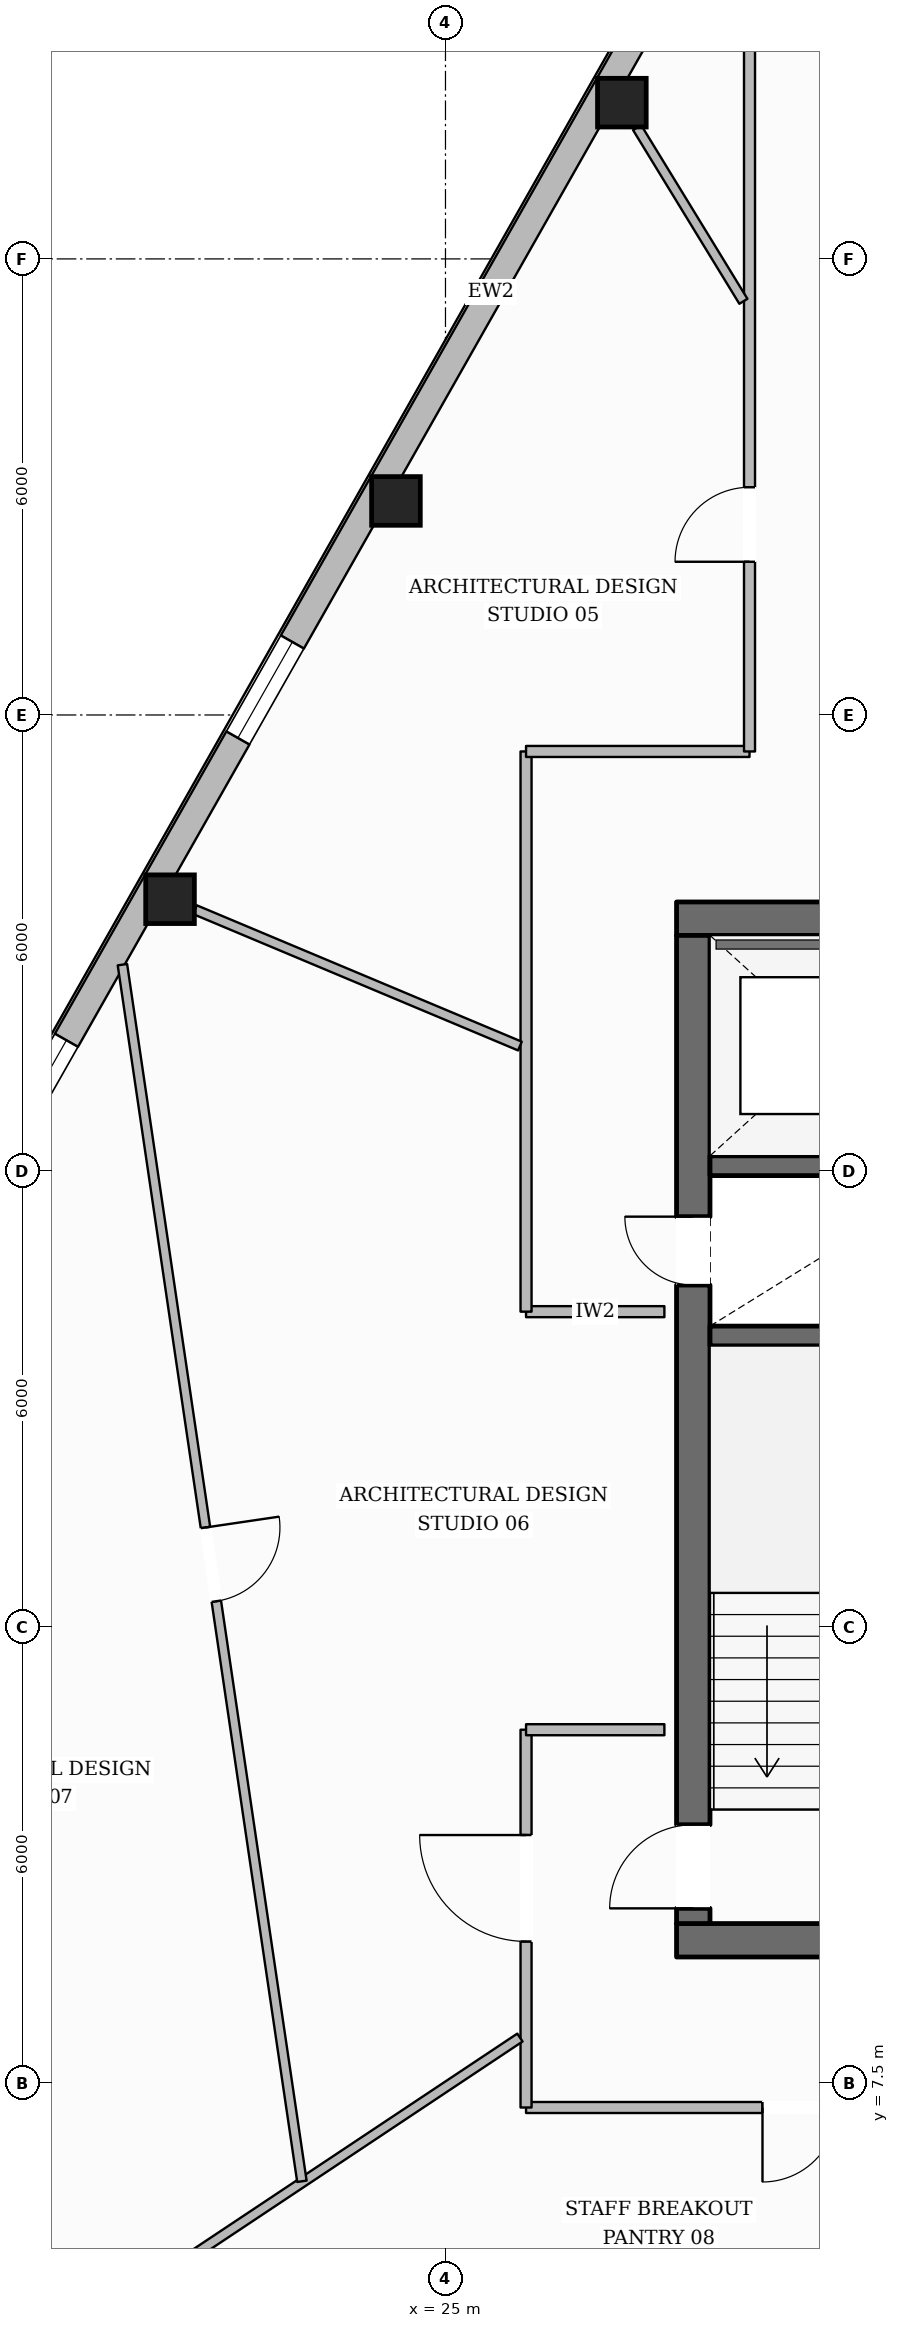
"""IFC4 building model, lengths in metres.
Left out: names, types, materials, properties, quantities, classifications, styles, units other than length and angle.
Written with IfcOpenShell. Run it as: python <this file> out.ifc"""

import sys

from ifc_helpers import new_model, si_unit, direction, frame, frame_2d, origin, origin_2d, place, context, subcontext, project, spatial, rectangle, hollow_rectangle, extrude, element, fill, save


model = new_model("IFC4")
c1 = context("Model", 3, precision=1e-05, world=origin(), true_north=direction((0.0, 1.0)))
c2 = subcontext(c1, "Body", "Model", "MODEL_VIEW")
j1 = project(units=[si_unit("LENGTHUNIT", "METRE"), si_unit("PLANEANGLEUNIT", "RADIAN")], contexts=[c1])
p1 = place(None, origin())
s1 = spatial("IfcSite", under=j1, at=p1, CompositionType="ELEMENT")
p2 = place(p1, origin())
s2 = spatial("IfcBuilding", under=s1, at=p2, CompositionType="ELEMENT")
p3 = place(p2, frame((0.0, 0.0, 165.0)))
s3 = spatial("IfcBuildingStorey", under=s2, at=p3, CompositionType="ELEMENT", Elevation=165.0)
p4 = place(p3, frame((28.04, 9.38, 0.0), z_axis=(0.0, 0.0, 1.0), x_axis=(1.0, 0.0, 0.0)))
e1 = element("IfcWall", 1, at=p4, inside=s3, PredefinedType="SOLIDWALL", context=c2, shape_type="SweptSolid", body=[
    extrude(rectangle(XDim=19.92, YDim=0.44, at=frame_2d((9.96, 0.0))), origin(), (0.0, 0.0, 1.0), 3.6),
])
p5 = place(p4, frame((10.46, 0.0, 0.0)))
e2 = element("IfcOpeningElement", 2, at=p5, cuts=e1, PredefinedType="OPENING", context=c2, shape_type="SweptSolid", body=[
    extrude(rectangle(XDim=1.4, YDim=2.2, at=frame_2d((0.7, 1.1))), frame((0.0, 0.23, 0.0), z_axis=(0.0, -1.0, 0.0), x_axis=(1.0, 0.0, 0.0)), (0.0, 0.0, 1.0), 0.46),
])
p6 = place(p3, frame((28.04, 22.82, 0.0), z_axis=(0.0, 0.0, 1.0), x_axis=(1.0, 0.0, 0.0)))
e3 = element("IfcWall", 3, at=p6, inside=s3, PredefinedType="SOLIDWALL", context=c2, shape_type="SweptSolid", body=[
    extrude(rectangle(XDim=19.92, YDim=0.44, at=frame_2d((9.96, 0.0))), origin(), (0.0, 0.0, 1.0), 3.6),
])
p7 = place(p6, frame((6.235, 0.0, 0.0)))
e4 = element("IfcOpeningElement", 4, at=p7, cuts=e3, PredefinedType="OPENING", context=c2, shape_type="SweptSolid", body=[
    extrude(rectangle(XDim=1.05, YDim=2.15, at=frame_2d((0.525, 1.075))), frame((0.0, 0.23, 0.0), z_axis=(0.0, -1.0, 0.0), x_axis=(1.0, 0.0, 0.0)), (0.0, 0.0, 1.0), 0.46),
])
p8 = place(p6, frame((12.635, 0.0, 0.0)))
e5 = element("IfcOpeningElement", 5, at=p8, cuts=e3, PredefinedType="OPENING", context=c2, shape_type="SweptSolid", body=[
    extrude(rectangle(XDim=1.05, YDim=2.15, at=frame_2d((0.525, 1.075))), frame((0.0, 0.23, 0.0), z_axis=(0.0, -1.0, 0.0), x_axis=(1.0, 0.0, 0.0)), (0.0, 0.0, 1.0), 0.46),
])
p9 = place(p3, frame((28.26, 9.6, 0.0), z_axis=(0.0, 0.0, 1.0), x_axis=(0.0, 1.0, 0.0)))
e6 = element("IfcWall", 6, at=p9, inside=s3, PredefinedType="SOLIDWALL", context=c2, shape_type="SweptSolid", body=[
    extrude(rectangle(XDim=13.0, YDim=0.44, at=frame_2d((6.5, 0.0))), origin(), (0.0, 0.0, 1.0), 3.6),
])
p10 = place(p9, frame((0.2, 0.0, 0.0)))
e7 = element("IfcOpeningElement", 7, at=p10, cuts=e6, PredefinedType="OPENING", context=c2, shape_type="SweptSolid", body=[
    extrude(rectangle(XDim=1.1, YDim=2.15, at=frame_2d((0.55, 1.075))), frame((0.0, 0.23, 0.0), z_axis=(0.0, -1.0, 0.0), x_axis=(1.0, 0.0, 0.0)), (0.0, 0.0, 1.0), 0.46),
])
p11 = place(p9, frame((8.4, 0.0, 0.0)))
e8 = element("IfcOpeningElement", 8, at=p11, cuts=e6, PredefinedType="OPENING", context=c2, shape_type="SweptSolid", body=[
    extrude(rectangle(XDim=0.9, YDim=2.1, at=frame_2d((0.45, 1.05))), frame((0.0, 0.23, 0.0), z_axis=(0.0, -1.0, 0.0), x_axis=(1.0, 0.0, 0.0)), (0.0, 0.0, 1.0), 0.46),
])
for number, where, z_axis, x_axis in (
    (9, (28.48, 17.33, 0.0), (0.0, 0.0, 1.0), (1.0, 0.0, 0.0)),
    (10, (28.48, 19.57, 0.0), (0.0, 0.0, 1.0), (1.0, 0.0, 0.0)),
):
    element("IfcWall", number, at=place(p3, frame(where, z_axis=z_axis, x_axis=x_axis)), inside=s3, PredefinedType="SHEAR", context=c2, shape_type="SweptSolid", body=[
        extrude(rectangle(XDim=3.2, YDim=0.26, at=frame_2d((1.6, 0.0))), origin(), (0.0, 0.0, 1.0), 3.6),
    ])
for number, where, z_axis, x_axis in (
    (11, (27.321, 33.556, 0.0), (0.0, 0.0, 1.0), (1.0, 0.0, 0.0)),
    (12, (24.348, 28.316, 0.0), (0.0, 0.0, 1.0), (1.0, 0.0, 0.0)),
    (13, (21.376, 23.076, 0.0), (0.0, 0.0, 1.0), (1.0, 0.0, 0.0)),
):
    element("IfcColumn", number, at=place(p3, frame(where, z_axis=z_axis, x_axis=x_axis)), inside=s3, PredefinedType="COLUMN", context=c2, shape_type="SweptSolid", body=[
        extrude(hollow_rectangle(XDim=0.64, YDim=0.64, WallThickness=0.028, at=origin_2d()), origin(), (0.0, 0.0, 1.0), 3.6),
    ])
p12 = place(p3, frame((14.964, 12.319, 0.0), z_axis=(0.0, 0.0, 1.0), x_axis=(0.493387150796, 0.869809817966, 0.0)))
e14 = element("IfcWall", 14, at=p12, inside=s3, PredefinedType="STANDARD", context=c2, shape_type="SweptSolid", body=[
    extrude(rectangle(XDim=37.096, YDim=0.35, at=frame_2d((18.548, 0.0))), origin(), (0.0, 0.0, 1.0), 3.132),
])
p13 = place(p12, frame((32.879, 0.0, 0.65)))
e15 = element("IfcOpeningElement", 15, at=p13, cuts=e14, PredefinedType="OPENING", context=c2, shape_type="SweptSolid", body=[
    extrude(rectangle(XDim=1.45, YDim=1.75, at=frame_2d((0.725, 0.875))), frame((0.0, 0.185, 0.0), z_axis=(0.0, -1.0, 0.0), x_axis=(1.0, 0.0, 0.0)), (0.0, 0.0, 1.0), 0.37),
])
p14 = place(p12, frame((26.855, 0.0, 0.65)))
e16 = element("IfcOpeningElement", 16, at=p14, cuts=e14, PredefinedType="OPENING", context=c2, shape_type="SweptSolid", body=[
    extrude(rectangle(XDim=1.45, YDim=1.75, at=frame_2d((0.725, 0.875))), frame((0.0, 0.185, 0.0), z_axis=(0.0, -1.0, 0.0), x_axis=(1.0, 0.0, 0.0)), (0.0, 0.0, 1.0), 0.37),
])
p15 = place(p12, frame((14.807, 0.0, 0.65)))
e17 = element("IfcOpeningElement", 17, at=p15, cuts=e14, PredefinedType="OPENING", context=c2, shape_type="SweptSolid", body=[
    extrude(rectangle(XDim=1.45, YDim=1.75, at=frame_2d((0.725, 0.875))), frame((0.0, 0.185, 0.0), z_axis=(0.0, -1.0, 0.0), x_axis=(1.0, 0.0, 0.0)), (0.0, 0.0, 1.0), 0.37),
])
p16 = place(p12, frame((8.783, 0.0, 0.65)))
e18 = element("IfcOpeningElement", 18, at=p16, cuts=e14, PredefinedType="OPENING", context=c2, shape_type="SweptSolid", body=[
    extrude(rectangle(XDim=1.45, YDim=1.75, at=frame_2d((0.725, 0.875))), frame((0.0, 0.185, 0.0), z_axis=(0.0, -1.0, 0.0), x_axis=(1.0, 0.0, 0.0)), (0.0, 0.0, 1.0), 0.37),
])
p17 = place(p12, frame((2.759, 0.0, 0.65)))
e19 = element("IfcOpeningElement", 19, at=p17, cuts=e14, PredefinedType="OPENING", context=c2, shape_type="SweptSolid", body=[
    extrude(rectangle(XDim=1.45, YDim=1.75, at=frame_2d((0.725, 0.875))), frame((0.0, 0.185, 0.0), z_axis=(0.0, -1.0, 0.0), x_axis=(1.0, 0.0, 0.0)), (0.0, 0.0, 1.0), 0.37),
])
p18 = place(p3, frame((20.176, 3.686, 0.0), z_axis=(0.0, 0.0, 1.0), x_axis=(-0.493371164069, 0.869818886013, 0.0)))
e20 = element("IfcWall", 20, at=p18, inside=s3, PredefinedType="STANDARD", context=c2, shape_type="SweptSolid", body=[
    extrude(rectangle(XDim=10.563, YDim=0.3, at=frame_2d((5.282, 0.0))), origin(), (0.0, 0.0, 1.0), 3.132),
])
p19 = place(p18, frame((4.757, 0.0, 0.65)))
e21 = element("IfcOpeningElement", 21, at=p19, cuts=e20, PredefinedType="OPENING", context=c2, shape_type="SweptSolid", body=[
    extrude(rectangle(XDim=1.05, YDim=1.7, at=frame_2d((0.525, 0.85))), frame((0.0, 0.16, 0.0), z_axis=(0.0, -1.0, 0.0), x_axis=(1.0, 0.0, 0.0)), (0.0, 0.0, 1.0), 0.32),
])
p20 = place(p3, frame((27.88, 17.65, 0.0), z_axis=(0.0, 0.0, 1.0), x_axis=(-1.0, 0.0, 0.0)))
e22 = element("IfcWall", 22, at=p20, inside=s3, PredefinedType="PARTITIONING", context=c2, shape_type="SweptSolid", body=[
    extrude(rectangle(XDim=1.82, YDim=0.145, at=frame_2d((0.91, 0.0))), origin(), (0.0, 0.0, 1.0), 3.6),
])
p21 = place(p3, frame((26.06, 17.65, 0.0), z_axis=(0.0, 0.0, 1.0), x_axis=(0.0, 1.0, 0.0)))
e23 = element("IfcWall", 23, at=p21, inside=s3, PredefinedType="PARTITIONING", context=c2, shape_type="SweptSolid", body=[
    extrude(rectangle(XDim=7.37, YDim=0.145, at=frame_2d((3.685, 0.0))), origin(), (0.0, 0.0, 1.0), 3.339),
])
p22 = place(p3, frame((26.06, 25.02, 0.0), z_axis=(0.0, 0.0, 1.0), x_axis=(1.0, 0.0, 0.0)))
e24 = element("IfcWall", 24, at=p22, inside=s3, PredefinedType="PARTITIONING", context=c2, shape_type="SweptSolid", body=[
    extrude(rectangle(XDim=2.94, YDim=0.145, at=frame_2d((1.47, 0.0))), origin(), (0.0, 0.0, 1.0), 3.6),
])
p23 = place(p3, frame((29.0, 25.02, 0.0), z_axis=(0.0, 0.0, 1.0), x_axis=(0.0, 1.0, 0.0)))
e25 = element("IfcWall", 25, at=p23, inside=s3, PredefinedType="PARTITIONING", context=c2, shape_type="SweptSolid", body=[
    extrude(rectangle(XDim=9.367, YDim=0.145, at=frame_2d((4.684, 0.0))), origin(), (0.0, 0.0, 1.0), 3.6),
])
p24 = place(p23, frame((2.496, 0.0, 0.0)))
e26 = element("IfcOpeningElement", 26, at=p24, cuts=e25, PredefinedType="OPENING", context=c2, shape_type="SweptSolid", body=[
    extrude(rectangle(XDim=0.98, YDim=2.15, at=frame_2d((0.49, 1.075))), frame((0.0, 0.083, 0.0), z_axis=(0.0, -1.0, 0.0), x_axis=(1.0, 0.0, 0.0)), (0.0, 0.0, 1.0), 0.165),
])
p25 = place(p3, frame((49.94, 7.18, 0.0), z_axis=(0.0, 0.0, 1.0), x_axis=(-1.0, 0.0, 0.0)))
e27 = element("IfcWall", 27, at=p25, inside=s3, PredefinedType="PARTITIONING", context=c2, shape_type="SweptSolid", body=[
    extrude(rectangle(XDim=23.88, YDim=0.145, at=frame_2d((11.94, 0.0))), origin(), (0.0, 0.0, 1.0), 3.6),
])
p26 = place(p25, frame((19.789, 0.0, 0.0)))
e28 = element("IfcOpeningElement", 28, at=p26, cuts=e27, PredefinedType="OPENING", context=c2, shape_type="SweptSolid", body=[
    extrude(rectangle(XDim=0.98, YDim=2.15, at=frame_2d((0.49, 1.075))), frame((0.0, 0.083, 0.0), z_axis=(0.0, -1.0, 0.0), x_axis=(1.0, 0.0, 0.0)), (0.0, 0.0, 1.0), 0.165),
])
p27 = place(p25, frame((9.236, 0.0, 0.0)))
e29 = element("IfcOpeningElement", 29, at=p27, cuts=e27, PredefinedType="OPENING", context=c2, shape_type="SweptSolid", body=[
    extrude(rectangle(XDim=0.98, YDim=2.15, at=frame_2d((0.49, 1.075))), frame((0.0, 0.083, 0.0), z_axis=(0.0, -1.0, 0.0), x_axis=(1.0, 0.0, 0.0)), (0.0, 0.0, 1.0), 0.165),
])
p28 = place(p3, frame((26.06, 7.18, 0.0), z_axis=(0.0, 0.0, 1.0), x_axis=(0.0, 1.0, 0.0)))
e30 = element("IfcWall", 30, at=p28, inside=s3, PredefinedType="PARTITIONING", context=c2, shape_type="SweptSolid", body=[
    extrude(rectangle(XDim=4.97, YDim=0.145, at=frame_2d((2.485, 0.0))), origin(), (0.0, 0.0, 1.0), 3.6),
])
p29 = place(p28, frame((2.185, 0.0, 0.0)))
e31 = element("IfcOpeningElement", 31, at=p29, cuts=e30, PredefinedType="OPENING", context=c2, shape_type="SweptSolid", body=[
    extrude(rectangle(XDim=1.4, YDim=2.2, at=frame_2d((0.7, 1.1))), frame((0.0, 0.083, 0.0), z_axis=(0.0, -1.0, 0.0), x_axis=(1.0, 0.0, 0.0)), (0.0, 0.0, 1.0), 0.165),
])
p30 = place(p3, frame((26.06, 12.15, 0.0), z_axis=(0.0, 0.0, 1.0), x_axis=(1.0, 0.0, 0.0)))
e32 = element("IfcWall", 32, at=p30, inside=s3, PredefinedType="PARTITIONING", context=c2, shape_type="SweptSolid", body=[
    extrude(rectangle(XDim=1.82, YDim=0.145, at=frame_2d((0.91, 0.0))), origin(), (0.0, 0.0, 1.0), 3.6),
])
p31 = place(p3, frame((28.919, 30.942, 0.0), z_axis=(0.0, 0.0, 1.0), x_axis=(-0.52187383072, 0.85302268716, 0.0)))
e33 = element("IfcWall", 33, at=p31, inside=s3, PredefinedType="PARTITIONING", context=c2, shape_type="SweptSolid", body=[
    extrude(rectangle(XDim=2.679, YDim=0.125, at=frame_2d((1.34, 0.0))), origin(), (0.0, 0.0, 1.0), 3.6),
])
p32 = place(p3, frame((25.979, 21.144, 0.0), z_axis=(0.0, 0.0, 1.0), x_axis=(-0.922095611861, 0.38696212035, 0.0)))
e34 = element("IfcWall", 34, at=p32, inside=s3, PredefinedType="PARTITIONING", context=c2, shape_type="SweptSolid", body=[
    extrude(rectangle(XDim=4.637, YDim=0.125, at=frame_2d((2.318, 0.0))), origin(), (0.0, 0.0, 1.0), 3.6),
])
p33 = place(p3, frame((25.979, 8.1, 0.0), z_axis=(0.0, 0.0, 1.0), x_axis=(-0.832482321267, -0.554051608407, 0.0)))
e35 = element("IfcWall", 35, at=p33, inside=s3, PredefinedType="PARTITIONING", context=c2, shape_type="SweptSolid", body=[
    extrude(rectangle(XDim=6.604, YDim=0.125, at=frame_2d((3.302, 0.0))), origin(), (0.0, 0.0, 1.0), 3.141),
])
p34 = place(p3, frame((20.75, 22.215, 0.0), z_axis=(0.0, 0.0, 1.0), x_axis=(0.145949252276, -0.989292078084, 0.0)))
e36 = element("IfcWall", 36, at=p34, inside=s3, PredefinedType="PARTITIONING", context=c2, shape_type="SweptSolid", body=[
    extrude(rectangle(XDim=16.179, YDim=0.125, at=frame_2d((8.09, 0.0))), origin(), (0.0, 0.0, 1.0), 3.339),
])
p35 = place(p34, frame((7.485, 0.0, 0.0)))
e37 = element("IfcOpeningElement", 37, at=p35, cuts=e36, PredefinedType="OPENING", context=c2, shape_type="SweptSolid", body=[
    extrude(rectangle(XDim=0.98, YDim=2.15, at=frame_2d((0.49, 1.075))), frame((0.0, 0.073, 0.0), z_axis=(0.0, -1.0, 0.0), x_axis=(1.0, 0.0, 0.0)), (0.0, 0.0, 1.0), 0.145),
])
p36 = place(p15, origin())
e38 = element("IfcWindow", 38, at=p36, inside=s3, PartitioningType="SINGLE_PANEL", PredefinedType="WINDOW", context=c2, shape_type="SweptSolid", body=[
    extrude(rectangle(XDim=1.45, YDim=1.75, at=frame_2d((0.725, 0.875))), frame((0.0, 0.03, 0.0), z_axis=(0.0, -1.0, 0.0), x_axis=(1.0, 0.0, 0.0)), (0.0, 0.0, 1.0), 0.06),
])
fill(e17, e38)
p37 = place(p16, origin())
e39 = element("IfcWindow", 39, at=p37, inside=s3, PartitioningType="SINGLE_PANEL", PredefinedType="WINDOW", context=c2, shape_type="SweptSolid", body=[
    extrude(rectangle(XDim=1.45, YDim=1.75, at=frame_2d((0.725, 0.875))), frame((0.0, 0.03, 0.0), z_axis=(0.0, -1.0, 0.0), x_axis=(1.0, 0.0, 0.0)), (0.0, 0.0, 1.0), 0.06),
])
fill(e18, e39)
p38 = place(p10, origin())
e40 = element("IfcDoor", 40, at=p38, inside=s3, OperationType="SINGLE_SWING_LEFT", PredefinedType="DOOR", context=c2, shape_type="SweptSolid", body=[
    extrude(rectangle(XDim=1.1, YDim=2.15, at=frame_2d((0.55, 1.075))), frame((0.0, 0.025, 0.0), z_axis=(0.0, -1.0, 0.0), x_axis=(1.0, 0.0, 0.0)), (0.0, 0.0, 1.0), 0.05),
])
fill(e7, e40)
p39 = place(p11, origin())
e41 = element("IfcDoor", 41, at=p39, inside=s3, OperationType="SINGLE_SWING_RIGHT", PredefinedType="DOOR", context=c2, shape_type="SweptSolid", body=[
    extrude(rectangle(XDim=0.9, YDim=2.1, at=frame_2d((0.45, 1.05))), frame((0.0, 0.025, 0.0), z_axis=(0.0, -1.0, 0.0), x_axis=(1.0, 0.0, 0.0)), (0.0, 0.0, 1.0), 0.05),
])
fill(e8, e41)
p40 = place(p24, origin())
e42 = element("IfcDoor", 42, at=p40, inside=s3, OperationType="SINGLE_SWING_LEFT", PredefinedType="DOOR", context=c2, shape_type="SweptSolid", body=[
    extrude(rectangle(XDim=0.98, YDim=2.15, at=frame_2d((0.49, 1.075))), frame((0.0, 0.025, 0.0), z_axis=(0.0, -1.0, 0.0), x_axis=(1.0, 0.0, 0.0)), (0.0, 0.0, 1.0), 0.05),
])
fill(e26, e42)
p41 = place(p29, origin())
e43 = element("IfcDoor", 43, at=p41, inside=s3, OperationType="SINGLE_SWING_RIGHT", PredefinedType="DOOR", context=c2, shape_type="SweptSolid", body=[
    extrude(rectangle(XDim=1.4, YDim=2.2, at=frame_2d((0.7, 1.1))), frame((0.0, 0.025, 0.0), z_axis=(0.0, -1.0, 0.0), x_axis=(1.0, 0.0, 0.0)), (0.0, 0.0, 1.0), 0.05),
])
fill(e31, e43)
p42 = place(p35, origin())
e44 = element("IfcDoor", 44, at=p42, inside=s3, OperationType="SINGLE_SWING_LEFT", PredefinedType="DOOR", context=c2, shape_type="SweptSolid", body=[
    extrude(rectangle(XDim=0.98, YDim=2.15, at=frame_2d((0.49, 1.075))), frame((0.0, 0.025, 0.0), z_axis=(0.0, -1.0, 0.0), x_axis=(1.0, 0.0, 0.0)), (0.0, 0.0, 1.0), 0.05),
])
fill(e37, e44)
p43 = place(p26, origin())
e45 = element("IfcDoor", 45, at=p43, inside=s3, OperationType="SINGLE_SWING_RIGHT", PredefinedType="DOOR", context=c2, shape_type="SweptSolid", body=[
    extrude(rectangle(XDim=0.98, YDim=2.15, at=frame_2d((0.49, 1.075))), frame((0.0, 0.025, 0.0), z_axis=(0.0, -1.0, 0.0), x_axis=(1.0, 0.0, 0.0)), (0.0, 0.0, 1.0), 0.05),
])
fill(e28, e45)
save(model, sys.argv[1])
